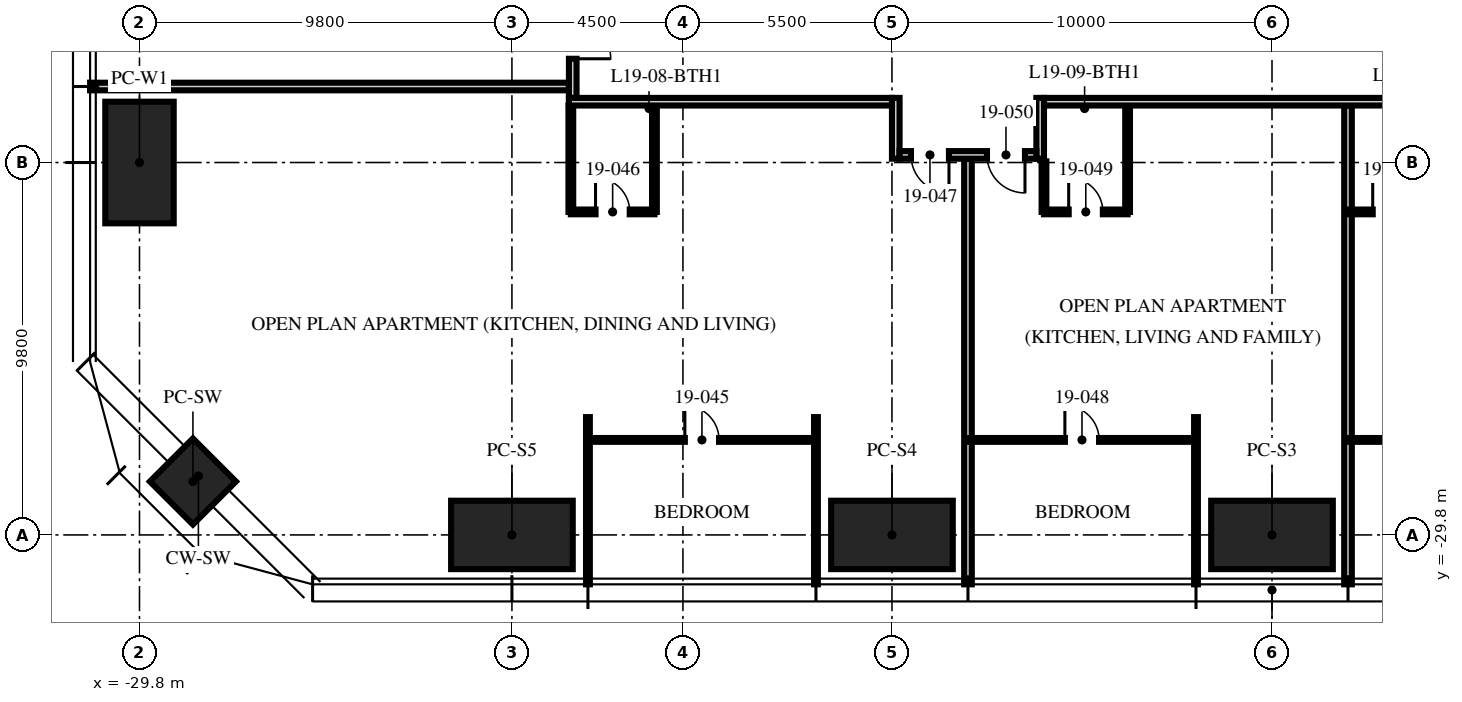
"""IFC4 building model, lengths in metres.
Left out: names, types, materials, properties, quantities, classifications, styles, units other than length and angle.
Written with IfcOpenShell. Run it as: python <this file> out.ifc"""

import sys

from ifc_helpers import new_model, si_unit, direction, frame, frame_2d, origin, origin_2d, place, context, subcontext, project, spatial, rectangle, hollow_rectangle, extrude, element, fill, save


model = new_model("IFC4")
c1 = context("Model", 3, precision=1e-05, world=origin(), true_north=direction((0.0, 1.0)))
c2 = subcontext(c1, "Body", "Model", "MODEL_VIEW")
j1 = project(units=[si_unit("LENGTHUNIT", "METRE"), si_unit("PLANEANGLEUNIT", "RADIAN")], contexts=[c1])
p1 = place(None, origin())
s1 = spatial("IfcSite", under=j1, at=p1, CompositionType="ELEMENT")
p2 = place(p1, origin())
s2 = spatial("IfcBuilding", under=s1, at=p2, CompositionType="ELEMENT")
p3 = place(p2, frame((0.0, 0.0, 77.25)))
s3 = spatial("IfcBuildingStorey", under=s2, at=p3, CompositionType="ELEMENT", Elevation=77.25)
for number, where, z_axis, x_axis in (
    (1, (0.0, -29.8, 0.0), (0.0, 0.0, 1.0), (1.0, 0.0, 0.0)),
    (2, (-10.0, -29.8, 0.0), (0.0, 0.0, 1.0), (1.0, 0.0, 0.0)),
    (3, (-20.0, -29.8, 0.0), (0.0, 0.0, 1.0), (1.0, 0.0, 0.0)),
    (4, (-29.8, -20.0, 0.0), (0.0, 0.0, 1.0), (0.0, 1.0, 0.0)),
):
    element("IfcColumn", number, at=place(p3, frame(where, z_axis=z_axis, x_axis=x_axis)), inside=s3, PredefinedType="COLUMN", context=c2, shape_type="SweptSolid", body=[
        extrude(hollow_rectangle(XDim=3.2, YDim=1.8, WallThickness=0.2, at=origin_2d()), origin(), (0.0, 0.0, 1.0), 3.75),
    ])
p4 = place(p3, frame((-28.394, -28.394, 0.0), z_axis=(0.0, 0.0, 1.0), x_axis=(0.707106781187, -0.707106781187, 0.0)))
e5 = element("IfcColumn", 5, at=p4, inside=s3, PredefinedType="COLUMN", context=c2, shape_type="SweptSolid", body=[
    extrude(hollow_rectangle(XDim=1.6, YDim=1.6, WallThickness=0.1, at=origin_2d()), origin(), (0.0, 0.0, 1.0), 3.75),
])
p5 = place(p3, frame((-18.5, -18.0, 0.0), z_axis=(0.0, 0.0, 1.0), x_axis=(-1.0, 0.0, 0.0)))
e6 = element("IfcWall", 6, at=p5, inside=s3, PredefinedType="PARTITIONING", context=c2, shape_type="SweptSolid", body=[
    extrude(rectangle(XDim=12.6, YDim=0.2, at=frame_2d((6.3, 0.0))), origin(), (0.0, 0.0, 1.0), 2.3),
])
for number, where, z_axis, x_axis in (
    (7, (-18.0, -26.7, 0.0), (0.0, 0.0, 1.0), (0.0, -1.0, 0.0)),
    (8, (-12.0, -26.7, 0.0), (0.0, 0.0, 1.0), (0.0, -1.0, 0.0)),
):
    element("IfcWall", number, at=place(p3, frame(where, z_axis=z_axis, x_axis=x_axis)), inside=s3, PredefinedType="PARTITIONING", context=c2, shape_type="SweptSolid", body=[
        extrude(rectangle(XDim=4.4, YDim=0.1, at=frame_2d((2.2, 0.0))), origin(), (0.0, 0.0, 1.0), 2.71),
    ])
p6 = place(p3, frame((-8.0, -19.9, 0.0), z_axis=(0.0, 0.0, 1.0), x_axis=(0.0, -1.0, 0.0)))
e9 = element("IfcWall", 9, at=p6, inside=s3, PredefinedType="PARTITIONING", context=c2, shape_type="SweptSolid", body=[
    extrude(rectangle(XDim=11.2, YDim=0.2, at=frame_2d((5.6, 0.0))), origin(), (0.0, 0.0, 1.0), 2.71),
])
p7 = place(p3, frame((-2.0, -26.7, 0.0), z_axis=(0.0, 0.0, 1.0), x_axis=(0.0, -1.0, 0.0)))
e10 = element("IfcWall", 10, at=p7, inside=s3, PredefinedType="PARTITIONING", context=c2, shape_type="SweptSolid", body=[
    extrude(rectangle(XDim=4.4, YDim=0.1, at=frame_2d((2.2, 0.0))), origin(), (0.0, 0.0, 1.0), 2.71),
])
p8 = place(p3, frame((2.0, -18.5, 0.0), z_axis=(0.0, 0.0, 1.0), x_axis=(0.0, -1.0, 0.0)))
e11 = element("IfcWall", 11, at=p8, inside=s3, PredefinedType="PARTITIONING", context=c2, shape_type="SweptSolid", body=[
    extrude(rectangle(XDim=12.6, YDim=0.2, at=frame_2d((6.3, 0.0))), origin(), (0.0, 0.0, 1.0), 2.71),
])
p9 = place(p3, frame((-18.0, -27.3, 0.0), z_axis=(0.0, 0.0, 1.0), x_axis=(1.0, 0.0, 0.0)))
e12 = element("IfcWall", 12, at=p9, inside=s3, PredefinedType="PARTITIONING", context=c2, shape_type="SweptSolid", body=[
    extrude(rectangle(XDim=6.0, YDim=0.1, at=frame_2d((3.0, 0.0))), origin(), (0.0, 0.0, 1.0), 2.61),
])
p10 = place(p9, frame((2.55, 0.0, 0.0)))
e13 = element("IfcOpeningElement", 13, at=p10, cuts=e12, PredefinedType="OPENING", context=c2, shape_type="SweptSolid", body=[
    extrude(rectangle(XDim=0.9, YDim=2.1, at=frame_2d((0.45, 1.05))), frame((0.0, 0.06, 0.0), z_axis=(0.0, -1.0, 0.0), x_axis=(1.0, 0.0, 0.0)), (0.0, 0.0, 1.0), 0.12),
])
p11 = place(p3, frame((-18.45, -21.3, 0.0), z_axis=(0.0, 0.0, 1.0), x_axis=(1.0, 0.0, 0.0)))
e14 = element("IfcWall", 14, at=p11, inside=s3, PredefinedType="PARTITIONING", context=c2, shape_type="SweptSolid", body=[
    extrude(rectangle(XDim=2.2, YDim=0.125, at=frame_2d((1.1, 0.0))), origin(), (0.0, 0.0, 1.0), 3.5),
])
p12 = place(p11, frame((0.65, 0.0, 0.0)))
e15 = element("IfcOpeningElement", 15, at=p12, cuts=e14, PredefinedType="OPENING", context=c2, shape_type="SweptSolid", body=[
    extrude(rectangle(XDim=0.9, YDim=2.1, at=frame_2d((0.45, 1.05))), frame((0.0, 0.073, 0.0), z_axis=(0.0, -1.0, 0.0), x_axis=(1.0, 0.0, 0.0)), (0.0, 0.0, 1.0), 0.145),
])
p13 = place(p3, frame((-18.45, -18.5, 0.0), z_axis=(0.0, 0.0, 1.0), x_axis=(0.0, -1.0, 0.0)))
e16 = element("IfcWall", 16, at=p13, inside=s3, PredefinedType="PARTITIONING", context=c2, shape_type="SweptSolid", body=[
    extrude(rectangle(XDim=2.8, YDim=0.125, at=frame_2d((1.4, 0.0))), origin(), (0.0, 0.0, 1.0), 2.3),
])
p14 = place(p3, frame((-16.25, -18.5, 0.0), z_axis=(0.0, 0.0, 1.0), x_axis=(0.0, -1.0, 0.0)))
e17 = element("IfcWall", 17, at=p14, inside=s3, PredefinedType="PARTITIONING", context=c2, shape_type="SweptSolid", body=[
    extrude(rectangle(XDim=2.8, YDim=0.125, at=frame_2d((1.4, 0.0))), origin(), (0.0, 0.0, 1.0), 3.5),
])
p15 = place(p3, frame((-8.0, -27.3, 0.0), z_axis=(0.0, 0.0, 1.0), x_axis=(1.0, 0.0, 0.0)))
e18 = element("IfcWall", 18, at=p15, inside=s3, PredefinedType="PARTITIONING", context=c2, shape_type="SweptSolid", body=[
    extrude(rectangle(XDim=6.0, YDim=0.1, at=frame_2d((3.0, 0.0))), origin(), (0.0, 0.0, 1.0), 2.61),
])
p16 = place(p15, frame((2.55, 0.0, 0.0)))
e19 = element("IfcOpeningElement", 19, at=p16, cuts=e18, PredefinedType="OPENING", context=c2, shape_type="SweptSolid", body=[
    extrude(rectangle(XDim=0.9, YDim=2.1, at=frame_2d((0.45, 1.05))), frame((0.0, 0.06, 0.0), z_axis=(0.0, -1.0, 0.0), x_axis=(1.0, 0.0, 0.0)), (0.0, 0.0, 1.0), 0.12),
])
p17 = place(p3, frame((-6.0, -21.3, 0.0), z_axis=(0.0, 0.0, 1.0), x_axis=(1.0, 0.0, 0.0)))
e20 = element("IfcWall", 20, at=p17, inside=s3, PredefinedType="PARTITIONING", context=c2, shape_type="SweptSolid", body=[
    extrude(rectangle(XDim=2.2, YDim=0.125, at=frame_2d((1.1, 0.0))), origin(), (0.0, 0.0, 1.0), 2.61),
])
p18 = place(p17, frame((0.65, 0.0, 0.0)))
e21 = element("IfcOpeningElement", 21, at=p18, cuts=e20, PredefinedType="OPENING", context=c2, shape_type="SweptSolid", body=[
    extrude(rectangle(XDim=0.9, YDim=2.1, at=frame_2d((0.45, 1.05))), frame((0.0, 0.073, 0.0), z_axis=(0.0, -1.0, 0.0), x_axis=(1.0, 0.0, 0.0)), (0.0, 0.0, 1.0), 0.145),
])
p19 = place(p3, frame((-6.0, -19.97, 0.0), z_axis=(0.0, 0.0, 1.0), x_axis=(0.0, -1.0, 0.0)))
e22 = element("IfcWall", 22, at=p19, inside=s3, PredefinedType="PARTITIONING", context=c2, shape_type="SweptSolid", body=[
    extrude(rectangle(XDim=1.33, YDim=0.125, at=frame_2d((0.665, 0.0))), origin(), (0.0, 0.0, 1.0), 3.5),
])
p20 = place(p3, frame((-3.8, -18.5, 0.0), z_axis=(0.0, 0.0, 1.0), x_axis=(0.0, -1.0, 0.0)))
e23 = element("IfcWall", 23, at=p20, inside=s3, PredefinedType="PARTITIONING", context=c2, shape_type="SweptSolid", body=[
    extrude(rectangle(XDim=2.8, YDim=0.125, at=frame_2d((1.4, 0.0))), origin(), (0.0, 0.0, 1.0), 3.5),
])
p21 = place(p3, frame((2.0, -27.3, 0.0), z_axis=(0.0, 0.0, 1.0), x_axis=(1.0, 0.0, 0.0)))
e24 = element("IfcWall", 24, at=p21, inside=s3, PredefinedType="PARTITIONING", context=c2, shape_type="SweptSolid", body=[
    extrude(rectangle(XDim=6.0, YDim=0.1, at=frame_2d((3.0, 0.0))), origin(), (0.0, 0.0, 1.0), 2.61),
])
p22 = place(p21, frame((2.55, 0.0, 0.0)))
e25 = element("IfcOpeningElement", 25, at=p22, cuts=e24, PredefinedType="OPENING", context=c2, shape_type="SweptSolid", body=[
    extrude(rectangle(XDim=0.9, YDim=2.1, at=frame_2d((0.45, 1.05))), frame((0.0, 0.06, 0.0), z_axis=(0.0, -1.0, 0.0), x_axis=(1.0, 0.0, 0.0)), (0.0, 0.0, 1.0), 0.12),
])
p23 = place(p3, frame((2.0, -21.3, 0.0), z_axis=(0.0, 0.0, 1.0), x_axis=(1.0, 0.0, 0.0)))
e26 = element("IfcWall", 26, at=p23, inside=s3, PredefinedType="PARTITIONING", context=c2, shape_type="SweptSolid", body=[
    extrude(rectangle(XDim=4.4, YDim=0.125, at=frame_2d((2.2, 0.0))), origin(), (0.0, 0.0, 1.0), 2.61),
])
p24 = place(p23, frame((0.65, 0.0, 0.0)))
e27 = element("IfcOpeningElement", 27, at=p24, cuts=e26, PredefinedType="OPENING", context=c2, shape_type="SweptSolid", body=[
    extrude(rectangle(XDim=0.9, YDim=2.1, at=frame_2d((0.45, 1.05))), frame((0.0, 0.073, 0.0), z_axis=(0.0, -1.0, 0.0), x_axis=(1.0, 0.0, 0.0)), (0.0, 0.0, 1.0), 0.145),
])
p25 = place(p23, frame((2.85, 0.0, 0.0)))
e28 = element("IfcOpeningElement", 28, at=p25, cuts=e26, PredefinedType="OPENING", context=c2, shape_type="SweptSolid", body=[
    extrude(rectangle(XDim=0.9, YDim=2.1, at=frame_2d((0.45, 1.05))), frame((0.0, 0.073, 0.0), z_axis=(0.0, -1.0, 0.0), x_axis=(1.0, 0.0, 0.0)), (0.0, 0.0, 1.0), 0.145),
])
p26 = place(p3, frame((-18.4, 18.3, 0.0), z_axis=(0.0, 0.0, 1.0), x_axis=(0.0, -1.0, 0.0)))
e29 = element("IfcWall", 29, at=p26, inside=s3, PredefinedType="PARTITIONING", context=c2, shape_type="SweptSolid", body=[
    extrude(rectangle(XDim=36.6, YDim=0.2, at=frame_2d((18.3, 0.0))), origin(), (0.0, 0.0, 1.0), 2.3),
])
p27 = place(p26, frame((8.57, 0.0, 0.0)))
e30 = element("IfcOpeningElement", 30, at=p27, cuts=e29, PredefinedType="OPENING", context=c2, shape_type="SweptSolid", body=[
    extrude(rectangle(XDim=1.0, YDim=2.2, at=frame_2d((0.5, 1.1))), frame((0.0, 0.11, 0.0), z_axis=(0.0, -1.0, 0.0), x_axis=(1.0, 0.0, 0.0)), (0.0, 0.0, 1.0), 0.22),
])
p28 = place(p26, frame((34.57, 0.0, 0.0)))
e31 = element("IfcOpeningElement", 31, at=p28, cuts=e29, PredefinedType="OPENING", context=c2, shape_type="SweptSolid", body=[
    extrude(rectangle(XDim=1.0, YDim=2.2, at=frame_2d((0.5, 1.1))), frame((0.0, 0.11, 0.0), z_axis=(0.0, -1.0, 0.0), x_axis=(1.0, 0.0, 0.0)), (0.0, 0.0, 1.0), 0.22),
])
p29 = place(p3, frame((18.5, -18.4, 0.0), z_axis=(0.0, 0.0, 1.0), x_axis=(-1.0, 0.0, 0.0)))
e32 = element("IfcWall", 32, at=p29, inside=s3, PredefinedType="PARTITIONING", context=c2, shape_type="SweptSolid", body=[
    extrude(rectangle(XDim=24.5, YDim=0.2, at=frame_2d((12.25, 0.0))), origin(), (0.0, 0.0, 1.0), 2.3),
])
p30 = place(p3, frame((-6.1, -18.3, 0.0), z_axis=(0.0, 0.0, 1.0), x_axis=(0.0, -1.0, 0.0)))
e33 = element("IfcWall", 33, at=p30, inside=s3, PredefinedType="PARTITIONING", context=c2, shape_type="SweptSolid", body=[
    extrude(rectangle(XDim=1.6, YDim=0.2, at=frame_2d((0.8, 0.0))), origin(), (0.0, 0.0, 1.0), 3.5),
])
p31 = place(p3, frame((-9.9, -18.3, 0.0), z_axis=(0.0, 0.0, 1.0), x_axis=(0.0, -1.0, 0.0)))
e34 = element("IfcWall", 34, at=p31, inside=s3, PredefinedType="PARTITIONING", context=c2, shape_type="SweptSolid", body=[
    extrude(rectangle(XDim=1.6, YDim=0.2, at=frame_2d((0.8, 0.0))), origin(), (0.0, 0.0, 1.0), 2.492),
])
p32 = place(p3, frame((-6.2, -19.8, 0.0), z_axis=(0.0, 0.0, 1.0), x_axis=(-1.0, 0.0, 0.0)))
e35 = element("IfcWall", 35, at=p32, inside=s3, PredefinedType="PARTITIONING", context=c2, shape_type="SweptSolid", body=[
    extrude(rectangle(XDim=3.6, YDim=0.2, at=frame_2d((1.8, 0.0))), origin(), (0.0, 0.0, 1.0), 3.5),
])
p33 = place(p32, frame((2.3, 0.0, 0.0)))
e36 = element("IfcOpeningElement", 36, at=p33, cuts=e35, PredefinedType="OPENING", context=c2, shape_type="SweptSolid", body=[
    extrude(rectangle(XDim=1.0, YDim=2.2, at=frame_2d((0.5, 1.1))), frame((0.0, 0.11, 0.0), z_axis=(0.0, -1.0, 0.0), x_axis=(1.0, 0.0, 0.0)), (0.0, 0.0, 1.0), 0.22),
])
p34 = place(p32, frame((0.3, 0.0, 0.0)))
e37 = element("IfcOpeningElement", 37, at=p34, cuts=e35, PredefinedType="OPENING", context=c2, shape_type="SweptSolid", body=[
    extrude(rectangle(XDim=1.0, YDim=2.2, at=frame_2d((0.5, 1.1))), frame((0.0, 0.11, 0.0), z_axis=(0.0, -1.0, 0.0), x_axis=(1.0, 0.0, 0.0)), (0.0, 0.0, 1.0), 0.22),
])
p35 = place(p3, frame((-10.0, -18.4, 0.0), z_axis=(0.0, 0.0, 1.0), x_axis=(-1.0, 0.0, 0.0)))
e38 = element("IfcWall", 38, at=p35, inside=s3, PredefinedType="PARTITIONING", context=c2, shape_type="SweptSolid", body=[
    extrude(rectangle(XDim=8.5, YDim=0.2, at=frame_2d((4.25, 0.0))), origin(), (0.0, 0.0, 1.0), 2.3),
])
p36 = place(p28, origin())
e39 = element("IfcDoor", 39, at=p36, inside=s3, OperationType="SINGLE_SWING_RIGHT", PredefinedType="DOOR", context=c2, shape_type="SweptSolid", body=[
    extrude(rectangle(XDim=1.0, YDim=2.2, at=frame_2d((0.5, 1.1))), frame((0.0, 0.025, 0.0), z_axis=(0.0, -1.0, 0.0), x_axis=(1.0, 0.0, 0.0)), (0.0, 0.0, 1.0), 0.05),
])
fill(e31, e39)
p37 = place(p10, origin())
e40 = element("IfcDoor", 40, at=p37, inside=s3, OperationType="SINGLE_SWING_LEFT", PredefinedType="DOOR", context=c2, shape_type="SweptSolid", body=[
    extrude(rectangle(XDim=0.9, YDim=2.1, at=frame_2d((0.45, 1.05))), frame((0.0, 0.025, 0.0), z_axis=(0.0, -1.0, 0.0), x_axis=(1.0, 0.0, 0.0)), (0.0, 0.0, 1.0), 0.05),
])
fill(e13, e40)
p38 = place(p12, origin())
e41 = element("IfcDoor", 41, at=p38, inside=s3, OperationType="SINGLE_SWING_LEFT", PredefinedType="DOOR", context=c2, shape_type="SweptSolid", body=[
    extrude(rectangle(XDim=0.9, YDim=2.1, at=frame_2d((0.45, 1.05))), frame((0.0, 0.025, 0.0), z_axis=(0.0, -1.0, 0.0), x_axis=(1.0, 0.0, 0.0)), (0.0, 0.0, 1.0), 0.05),
])
fill(e15, e41)
p39 = place(p33, origin())
e42 = element("IfcDoor", 42, at=p39, inside=s3, OperationType="SINGLE_SWING_LEFT", PredefinedType="DOOR", context=c2, shape_type="SweptSolid", body=[
    extrude(rectangle(XDim=1.0, YDim=2.2, at=frame_2d((0.5, 1.1))), frame((0.0, 0.025, 0.0), z_axis=(0.0, -1.0, 0.0), x_axis=(1.0, 0.0, 0.0)), (0.0, 0.0, 1.0), 0.05),
])
fill(e36, e42)
p40 = place(p16, origin())
e43 = element("IfcDoor", 43, at=p40, inside=s3, OperationType="SINGLE_SWING_LEFT", PredefinedType="DOOR", context=c2, shape_type="SweptSolid", body=[
    extrude(rectangle(XDim=0.9, YDim=2.1, at=frame_2d((0.45, 1.05))), frame((0.0, 0.025, 0.0), z_axis=(0.0, -1.0, 0.0), x_axis=(1.0, 0.0, 0.0)), (0.0, 0.0, 1.0), 0.05),
])
fill(e19, e43)
p41 = place(p18, origin())
e44 = element("IfcDoor", 44, at=p41, inside=s3, OperationType="SINGLE_SWING_LEFT", PredefinedType="DOOR", context=c2, shape_type="SweptSolid", body=[
    extrude(rectangle(XDim=0.9, YDim=2.1, at=frame_2d((0.45, 1.05))), frame((0.0, 0.025, 0.0), z_axis=(0.0, -1.0, 0.0), x_axis=(1.0, 0.0, 0.0)), (0.0, 0.0, 1.0), 0.05),
])
fill(e21, e44)
p42 = place(p34, origin())
e45 = element("IfcDoor", 45, at=p42, inside=s3, OperationType="SINGLE_SWING_LEFT", PredefinedType="DOOR", context=c2, shape_type="SweptSolid", body=[
    extrude(rectangle(XDim=1.0, YDim=2.2, at=frame_2d((0.5, 1.1))), frame((0.0, 0.025, 0.0), z_axis=(0.0, -1.0, 0.0), x_axis=(1.0, 0.0, 0.0)), (0.0, 0.0, 1.0), 0.05),
])
fill(e37, e45)
p43 = place(p24, origin())
e46 = element("IfcDoor", 46, at=p43, inside=s3, OperationType="SINGLE_SWING_LEFT", PredefinedType="DOOR", context=c2, shape_type="SweptSolid", body=[
    extrude(rectangle(XDim=0.9, YDim=2.1, at=frame_2d((0.45, 1.05))), frame((0.0, 0.025, 0.0), z_axis=(0.0, -1.0, 0.0), x_axis=(1.0, 0.0, 0.0)), (0.0, 0.0, 1.0), 0.05),
])
fill(e27, e46)
save(model, sys.argv[1])
